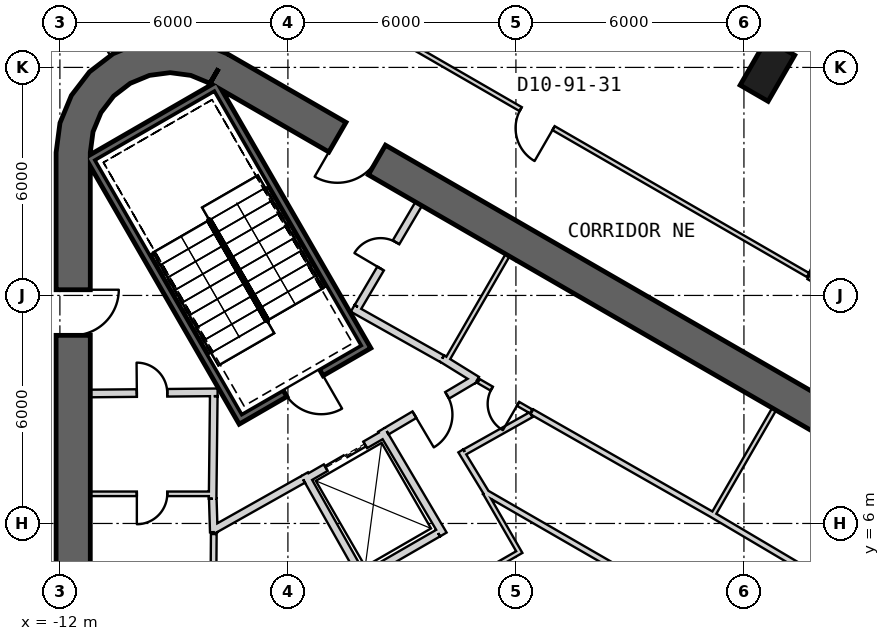
"""IFC4 building model, lengths in metres.
Left out: names, types, materials, properties, quantities, classifications, styles, units other than length and angle.
Written with IfcOpenShell. Run it as: python <this file> out.ifc"""

import sys

from ifc_helpers import new_model, si_unit, direction, frame, frame_2d, origin, origin_2d, place, context, subcontext, project, spatial, polyline, rectangle, outline, extrude, element, fill, save


model = new_model("IFC4")
c1 = context("Model", 3, precision=1e-05, world=origin(), true_north=direction((0.0, 1.0)))
c2 = subcontext(c1, "Body", "Model", "MODEL_VIEW")
j1 = project(units=[si_unit("LENGTHUNIT", "METRE"), si_unit("PLANEANGLEUNIT", "RADIAN")], contexts=[c1])
p1 = place(None, origin())
s1 = spatial("IfcSite", under=j1, at=p1, CompositionType="ELEMENT")
p2 = place(p1, origin())
s2 = spatial("IfcBuilding", under=s1, at=p2, CompositionType="ELEMENT")
p3 = place(p2, frame((0.0, 0.0, 398.3)))
s3 = spatial("IfcBuildingStorey", under=s2, at=p3, CompositionType="ELEMENT", Elevation=398.3)
p4 = place(p3, frame((6.618, 17.927, -0.3), z_axis=(0.0, 0.0, 1.0), x_axis=(0.5, 0.866025403784, 0.0)))
e1 = element("IfcColumn", 1, at=p4, inside=s3, PredefinedType="COLUMN", context=c2, shape_type="SweptSolid", body=[
    extrude(rectangle(XDim=1.4, YDim=0.85, at=origin_2d()), origin(), (0.0, 0.0, 1.0), 6.8),
])
p5 = place(p3, frame((19.475, 2.208, 0.0), z_axis=(0.0, 0.0, 1.0), x_axis=(-0.866028369851, 0.499994862586, 0.0)))
e2 = element("IfcWall", 2, at=p5, inside=s3, PredefinedType="SHEAR", context=c2, shape_type="SweptSolid", body=[
    extrude(rectangle(XDim=31.523, YDim=0.9, at=frame_2d((15.762, 0.0))), origin(), (0.0, 0.0, 1.0), 6.5),
])
p6 = place(p5, frame((3.612, 0.0, 0.0)))
e3 = element("IfcOpeningElement", 3, at=p6, cuts=e2, PredefinedType="OPENING", context=c2, shape_type="SweptSolid", body=[
    extrude(rectangle(XDim=1.2, YDim=2.4, at=frame_2d((0.6, 1.2))), frame((0.0, 0.46, 0.0), z_axis=(0.0, -1.0, 0.0), x_axis=(1.0, 0.0, 0.0)), (0.0, 0.0, 1.0), 0.92),
])
p7 = place(p5, frame((26.712, 0.0, 0.0)))
e4 = element("IfcOpeningElement", 4, at=p7, cuts=e2, PredefinedType="OPENING", context=c2, shape_type="SweptSolid", body=[
    extrude(rectangle(XDim=1.2, YDim=2.4, at=frame_2d((0.6, 1.2))), frame((0.0, 0.46, 0.0), z_axis=(0.0, -1.0, 0.0), x_axis=(1.0, 0.0, 0.0)), (0.0, 0.0, 1.0), 0.92),
])
p8 = place(p3, frame((-11.65, 15.762, 0.0), z_axis=(0.0, 0.0, 1.0), x_axis=(0.0, -1.0, 0.0)))
e5 = element("IfcWall", 5, at=p8, inside=s3, PredefinedType="SHEAR", context=c2, shape_type="SweptSolid", body=[
    extrude(rectangle(XDim=31.523, YDim=0.9, at=frame_2d((15.762, 0.0))), origin(), (0.0, 0.0, 1.0), 6.5),
])
p9 = place(p8, frame((3.612, 0.0, 0.0)))
e6 = element("IfcOpeningElement", 6, at=p9, cuts=e5, PredefinedType="OPENING", context=c2, shape_type="SweptSolid", body=[
    extrude(rectangle(XDim=1.2, YDim=2.4, at=frame_2d((0.6, 1.2))), frame((0.0, 0.46, 0.0), z_axis=(0.0, -1.0, 0.0), x_axis=(1.0, 0.0, 0.0)), (0.0, 0.0, 1.0), 0.92),
])
p10 = place(p8, frame((26.712, 0.0, 0.0)))
e7 = element("IfcOpeningElement", 7, at=p10, cuts=e5, PredefinedType="OPENING", context=c2, shape_type="SweptSolid", body=[
    extrude(rectangle(XDim=1.2, YDim=2.4, at=frame_2d((0.6, 1.2))), frame((0.0, 0.46, 0.0), z_axis=(0.0, -1.0, 0.0), x_axis=(1.0, 0.0, 0.0)), (0.0, 0.0, 1.0), 0.92),
])
p11 = place(p3, origin())
e8 = element("IfcWall", 8, at=p11, inside=s3, PredefinedType="SHEAR", context=c2, shape_type="SweptSolid", body=[
    extrude(outline(polyline([(-7.6, 18.36), (-8.323, 18.659), (-9.1, 18.762), (-9.876, 18.659), (-10.6, 18.36), (-11.221, 17.883), (-11.698, 17.262), (-11.998, 16.538), (-12.1, 15.762), (-11.2, 15.762), (-11.128, 16.305), (-10.919, 16.812), (-10.585, 17.247), (-10.15, 17.58), (-9.644, 17.79), (-9.1, 17.862), (-8.556, 17.79), (-8.05, 17.58), (-7.6, 18.36)])), origin(), (0.0, 0.0, 1.0), 6.5),
])
p12 = place(p3, frame((-11.245, 15.678, -0.3), z_axis=(0.0, 0.0, 1.0), x_axis=(0.499977274689, -0.866038523851, 0.0)))
e9 = element("IfcWall", 9, at=p12, inside=s3, PredefinedType="SHEAR", context=c2, shape_type="SweptSolid", body=[
    extrude(rectangle(XDim=8.1, YDim=0.2, at=frame_2d((4.05, 0.0))), origin(), (0.0, 0.0, 1.0), 6.5),
])
p13 = place(p3, frame((-7.818, 17.541, -0.3), z_axis=(0.0, 0.0, 1.0), x_axis=(-0.866044365799, -0.499967155389, 0.0)))
e10 = element("IfcWall", 10, at=p13, inside=s3, PredefinedType="SHEAR", context=c2, shape_type="SweptSolid", body=[
    extrude(rectangle(XDim=3.8, YDim=0.2, at=frame_2d((1.9, 0.0))), origin(), (0.0, 0.0, 1.0), 6.5),
])
p14 = place(p3, frame((-7.854, 17.405, -0.3), z_axis=(0.0, 0.0, 1.0), x_axis=(0.499997992926, -0.866026562566, 0.0)))
e11 = element("IfcWall", 11, at=p14, inside=s3, PredefinedType="SHEAR", context=c2, shape_type="SweptSolid", body=[
    extrude(rectangle(XDim=7.9, YDim=0.2, at=frame_2d((3.95, 0.0))), origin(), (0.0, 0.0, 1.0), 6.5),
])
p15 = place(p3, frame((-7.159, 8.8, -0.3), z_axis=(0.0, 0.0, 1.0), x_axis=(0.866047807691, 0.499961193289, 0.0)))
e12 = element("IfcWall", 12, at=p15, inside=s3, PredefinedType="SHEAR", context=c2, shape_type="SweptSolid", body=[
    extrude(rectangle(XDim=3.6, YDim=0.2, at=frame_2d((1.8, 0.0))), origin(), (0.0, 0.0, 1.0), 6.5),
])
p16 = place(p15, frame((1.25, 0.0, 0.3)))
e13 = element("IfcOpeningElement", 13, at=p16, cuts=e12, PredefinedType="OPENING", context=c2, shape_type="SweptSolid", body=[
    extrude(rectangle(XDim=1.1, YDim=2.1, at=frame_2d((0.55, 1.05))), frame((0.0, 0.11, 0.0), z_axis=(0.0, -1.0, 0.0), x_axis=(1.0, 0.0, 0.0)), (0.0, 0.0, 1.0), 0.22),
])
p17 = place(p3, frame((-5.524, 7.168, 0.0), z_axis=(0.0, 0.0, 1.0), x_axis=(0.866024647952, 0.500001309137, 0.0)))
e14 = element("IfcWall", 14, at=p17, inside=s3, PredefinedType="PLUMBINGWALL", context=c2, shape_type="SweptSolid", body=[
    extrude(rectangle(XDim=2.4, YDim=0.2, at=frame_2d((1.2, 0.0))), origin(), (0.0, 0.0, 1.0), 6.2),
])
p18 = place(p17, frame((0.6, 0.0, 0.0)))
e15 = element("IfcOpeningElement", 15, at=p18, cuts=e14, PredefinedType="OPENING", context=c2, shape_type="SweptSolid", body=[
    extrude(rectangle(XDim=1.2, YDim=2.4, at=frame_2d((0.6, 1.2))), frame((0.0, 0.11, 0.0), z_axis=(0.0, -1.0, 0.0), x_axis=(1.0, 0.0, 0.0)), (0.0, 0.0, 1.0), 0.22),
])
p19 = place(p3, frame((-2.047, 5.746, 0.0), z_axis=(0.0, 0.0, 1.0), x_axis=(-0.86605622881, -0.499946605688, 0.0)))
e16 = element("IfcWall", 16, at=p19, inside=s3, PredefinedType="PLUMBINGWALL", context=c2, shape_type="SweptSolid", body=[
    extrude(rectangle(XDim=2.2, YDim=0.2, at=frame_2d((1.1, 0.0))), origin(), (0.0, 0.0, 1.0), 6.2),
])
p20 = place(p3, frame((-3.99, 4.509, 0.0), z_axis=(0.0, 0.0, 1.0), x_axis=(-0.491358283181, 0.870957540612, 0.0)))
e17 = element("IfcWall", 17, at=p20, inside=s3, PredefinedType="PLUMBINGWALL", context=c2, shape_type="SweptSolid", body=[
    extrude(rectangle(XDim=3.2, YDim=0.2, at=frame_2d((1.6, 0.0))), origin(), (0.0, 0.0, 1.0), 6.2),
])
p21 = place(p3, frame((-3.538, 8.465, 0.0), z_axis=(0.0, 0.0, 1.0), x_axis=(0.508616218331, -0.860993346345, 0.0)))
e18 = element("IfcWall", 18, at=p21, inside=s3, PredefinedType="PLUMBINGWALL", context=c2, shape_type="SweptSolid", body=[
    extrude(rectangle(XDim=3.2, YDim=0.2, at=frame_2d((1.6, 0.0))), origin(), (0.0, 0.0, 1.0), 6.2),
])
p22 = place(p3, frame((-7.95, 6.78, 0.0), z_axis=(0.0, 0.0, 1.0), x_axis=(-1.0, 0.0, 0.0)))
e19 = element("IfcWall", 19, at=p22, inside=s3, PredefinedType="PARTITIONING", context=c2, shape_type="SweptSolid", body=[
    extrude(rectangle(XDim=3.25, YDim=0.12, at=frame_2d((1.625, 0.0))), origin(), (0.0, 0.0, 1.0), 6.2),
])
p23 = place(p22, frame((1.225, 0.0, 0.0)))
e20 = element("IfcOpeningElement", 20, at=p23, cuts=e19, PredefinedType="OPENING", context=c2, shape_type="SweptSolid", body=[
    extrude(rectangle(XDim=0.8, YDim=2.1, at=frame_2d((0.4, 1.05))), frame((0.0, 0.07, 0.0), z_axis=(0.0, -1.0, 0.0), x_axis=(1.0, 0.0, 0.0)), (0.0, 0.0, 1.0), 0.14),
])
p24 = place(p3, frame((-7.85, 9.451, 0.0), z_axis=(0.0, 0.0, 1.0), x_axis=(-0.999957167047, -0.009255488683, 0.0)))
e21 = element("IfcWall", 21, at=p24, inside=s3, PredefinedType="PARTITIONING", context=c2, shape_type="SweptSolid", body=[
    extrude(rectangle(XDim=3.35, YDim=0.2, at=frame_2d((1.675, 0.0))), origin(), (0.0, 0.0, 1.0), 6.2),
])
p25 = place(p24, frame((1.325, 0.0, 0.0)))
e22 = element("IfcOpeningElement", 22, at=p25, cuts=e21, PredefinedType="OPENING", context=c2, shape_type="SweptSolid", body=[
    extrude(rectangle(XDim=0.8, YDim=2.1, at=frame_2d((0.4, 1.05))), frame((0.0, 0.11, 0.0), z_axis=(0.0, -1.0, 0.0), x_axis=(1.0, 0.0, 0.0)), (0.0, 0.0, 1.0), 0.22),
])
p26 = place(p3, frame((-7.981, 6.65, 0.0), z_axis=(0.0, 0.0, 1.0), x_axis=(0.011120469654, 0.999938165666, 0.0)))
e23 = element("IfcWall", 23, at=p26, inside=s3, PredefinedType="PARTITIONING", context=c2, shape_type="SweptSolid", body=[
    extrude(rectangle(XDim=2.7, YDim=0.2, at=frame_2d((1.35, 0.0))), origin(), (0.0, 0.0, 1.0), 6.2),
])
p27 = place(p3, frame((-7.95, 5.772, 0.0), z_axis=(0.0, 0.0, 1.0), x_axis=(-0.030861509705, 0.999523670164, 0.0)))
e24 = element("IfcWall", 24, at=p27, inside=s3, PredefinedType="PARTITIONING", context=c2, shape_type="SweptSolid", body=[
    extrude(rectangle(XDim=0.878, YDim=0.2, at=frame_2d((0.439, 0.0))), origin(), (0.0, 0.0, 1.0), 6.2),
])
p28 = place(p3, frame((-7.951, 5.722, 0.0), z_axis=(0.0, 0.0, 1.0), x_axis=(-0.006701139535, -0.999977547112, 0.0)))
e25 = element("IfcWall", 25, at=p28, inside=s3, PredefinedType="PLUMBINGWALL", context=c2, shape_type="SweptSolid", body=[
    extrude(rectangle(XDim=4.372, YDim=0.15, at=frame_2d((2.186, 0.0))), origin(), (0.0, 0.0, 1.0), 6.2),
])
p29 = place(p3, frame((5.17, 6.195, 0.0), z_axis=(0.0, 0.0, 1.0), x_axis=(0.499984717929, 0.866034226713, 0.0)))
e26 = element("IfcWall", 26, at=p29, inside=s3, PredefinedType="PARTITIONING", context=c2, shape_type="SweptSolid", body=[
    extrude(rectangle(XDim=3.25, YDim=0.12, at=frame_2d((1.625, 0.0))), origin(), (0.0, 0.0, 1.0), 6.2),
])
p30 = place(p3, frame((7.53, 4.833, 0.0), z_axis=(0.0, 0.0, 1.0), x_axis=(-0.860550523279, 0.509365091938, 0.0)))
e27 = element("IfcWall", 27, at=p30, inside=s3, PredefinedType="PLUMBINGWALL", context=c2, shape_type="SweptSolid", body=[
    extrude(rectangle(XDim=2.755, YDim=0.15, at=frame_2d((1.377, 0.0))), origin(), (0.0, 0.0, 1.0), 6.2),
])
p31 = place(p3, frame((-0.22, 13.06, 0.0), z_axis=(0.0, 0.0, 1.0), x_axis=(-0.499984717929, -0.866034226713, 0.0)))
e28 = element("IfcWall", 28, at=p31, inside=s3, PredefinedType="PARTITIONING", context=c2, shape_type="SweptSolid", body=[
    extrude(rectangle(XDim=3.25, YDim=0.12, at=frame_2d((1.625, 0.0))), origin(), (0.0, 0.0, 1.0), 6.2),
])
p32 = place(p3, frame((-1.941, 10.339, 0.0), z_axis=(0.0, 0.0, 1.0), x_axis=(0.850216889117, -0.526432561171, 0.0)))
e29 = element("IfcWall", 29, at=p32, inside=s3, PredefinedType="PARTITIONING", context=c2, shape_type="SweptSolid", body=[
    extrude(rectangle(XDim=1.078, YDim=0.2, at=frame_2d((0.539, 0.0))), origin(), (0.0, 0.0, 1.0), 6.2),
])
p33 = place(p3, frame((0.42, 8.938, 0.0), z_axis=(0.0, 0.0, 1.0), x_axis=(0.868754934783, -0.495242226886, 0.0)))
e30 = element("IfcWall", 30, at=p33, inside=s3, PredefinedType="PLUMBINGWALL", context=c2, shape_type="SweptSolid", body=[
    extrude(rectangle(XDim=5.455, YDim=0.15, at=frame_2d((2.728, 0.0))), origin(), (0.0, 0.0, 1.0), 6.2),
])
p34 = place(p3, frame((-0.981, 9.746, 0.0), z_axis=(0.0, 0.0, 1.0), x_axis=(0.866019818373, -0.500009674092, 0.0)))
e31 = element("IfcWall", 31, at=p34, inside=s3, PredefinedType="PARTITIONING", context=c2, shape_type="SweptSolid", body=[
    extrude(rectangle(XDim=1.594, YDim=0.12, at=frame_2d((0.797, 0.0))), origin(), (0.0, 0.0, 1.0), 6.2),
])
p35 = place(p34, frame((0.397, 0.0, 0.0)))
e32 = element("IfcOpeningElement", 32, at=p35, cuts=e31, PredefinedType="OPENING", context=c2, shape_type="SweptSolid", body=[
    extrude(rectangle(XDim=0.8, YDim=2.1, at=frame_2d((0.4, 1.05))), frame((0.0, 0.07, 0.0), z_axis=(0.0, -1.0, 0.0), x_axis=(1.0, 0.0, 0.0)), (0.0, 0.0, 1.0), 0.14),
])
p36 = place(p3, frame((-4.296, 11.659, 0.0), z_axis=(0.0, 0.0, 1.0), x_axis=(0.871534483978, -0.490334215854, 0.0)))
e33 = element("IfcWall", 33, at=p36, inside=s3, PredefinedType="PARTITIONING", context=c2, shape_type="SweptSolid", body=[
    extrude(rectangle(XDim=2.7, YDim=0.2, at=frame_2d((1.35, 0.0))), origin(), (0.0, 0.0, 1.0), 6.2),
])
p37 = place(p3, frame((-2.558, 14.409, 0.0), z_axis=(0.0, 0.0, 1.0), x_axis=(-0.508018930956, -0.861345903683, 0.0)))
e34 = element("IfcWall", 34, at=p37, inside=s3, PredefinedType="PARTITIONING", context=c2, shape_type="SweptSolid", body=[
    extrude(rectangle(XDim=3.15, YDim=0.2, at=frame_2d((1.575, 0.0))), origin(), (0.0, 0.0, 1.0), 6.2),
])
p38 = place(p37, frame((1.175, 0.0, 0.0)))
e35 = element("IfcOpeningElement", 35, at=p38, cuts=e34, PredefinedType="OPENING", context=c2, shape_type="SweptSolid", body=[
    extrude(rectangle(XDim=0.8, YDim=2.1, at=frame_2d((0.4, 1.05))), frame((0.0, 0.11, 0.0), z_axis=(0.0, -1.0, 0.0), x_axis=(1.0, 0.0, 0.0)), (0.0, 0.0, 1.0), 0.22),
])
p39 = place(p3, frame((-5.6, 7.16, 0.0), z_axis=(0.0, 0.0, 1.0), x_axis=(-0.871345799774, -0.490669437825, 0.0)))
e36 = element("IfcWall", 36, at=p39, inside=s3, PredefinedType="PARTITIONING", context=c2, shape_type="SweptSolid", body=[
    extrude(rectangle(XDim=2.726, YDim=0.2, at=frame_2d((1.363, 0.0))), origin(), (0.0, 0.0, 1.0), 6.2),
])
p40 = place(p3, frame((-1.069, 9.81, 0.0), z_axis=(0.0, 0.0, 1.0), x_axis=(-0.860617791406, -0.509251428192, 0.0)))
e37 = element("IfcWall", 37, at=p40, inside=s3, PredefinedType="PARTITIONING", context=c2, shape_type="SweptSolid", body=[
    extrude(rectangle(XDim=2.709, YDim=0.2, at=frame_2d((1.354, 0.0))), origin(), (0.0, 0.0, 1.0), 6.2),
])
p41 = place(p40, frame((0.861, 0.0, 0.0)))
e38 = element("IfcOpeningElement", 38, at=p41, cuts=e37, PredefinedType="OPENING", context=c2, shape_type="SweptSolid", body=[
    extrude(rectangle(XDim=1.0, YDim=2.1, at=frame_2d((0.5, 1.05))), frame((0.0, 0.11, 0.0), z_axis=(0.0, -1.0, 0.0), x_axis=(1.0, 0.0, 0.0)), (0.0, 0.0, 1.0), 0.22),
])
p42 = place(p3, frame((-0.827, 6.832, 0.0), z_axis=(0.0, 0.0, 1.0), x_axis=(0.866020293397, -0.500008851346, 0.0)))
e39 = element("IfcWall", 39, at=p42, inside=s3, PredefinedType="PLUMBINGWALL", context=c2, shape_type="SweptSolid", body=[
    extrude(rectangle(XDim=8.264, YDim=0.15, at=frame_2d((4.132, 0.0))), origin(), (0.0, 0.0, 1.0), 6.2),
])
p43 = place(p3, frame((-1.451, 7.909, 0.0), z_axis=(0.0, 0.0, 1.0), x_axis=(0.520332410011, -0.853963806664, 0.0)))
e40 = element("IfcWall", 40, at=p43, inside=s3, PredefinedType="PLUMBINGWALL", context=c2, shape_type="SweptSolid", body=[
    extrude(rectangle(XDim=1.326, YDim=0.15, at=frame_2d((0.663, 0.0))), origin(), (0.0, 0.0, 1.0), 6.2),
])
p44 = place(p3, frame((0.399, 8.863, 0.0), z_axis=(0.0, 0.0, 1.0), x_axis=(-0.871829419551, -0.489809619348, 0.0)))
e41 = element("IfcWall", 41, at=p44, inside=s3, PredefinedType="PLUMBINGWALL", context=c2, shape_type="SweptSolid", body=[
    extrude(rectangle(XDim=2.002, YDim=0.15, at=frame_2d((1.001, 0.0))), origin(), (0.0, 0.0, 1.0), 6.2),
])
p45 = place(p3, frame((0.14, 5.277, 0.0), z_axis=(0.0, 0.0, 1.0), x_axis=(-0.866000971088, -0.500042316284, 0.0)))
e42 = element("IfcWall", 42, at=p45, inside=s3, PredefinedType="PARTITIONING", context=c2, shape_type="SweptSolid", body=[
    extrude(rectangle(XDim=1.85, YDim=0.12, at=frame_2d((0.925, 0.0))), origin(), (0.0, 0.0, 1.0), 6.2),
])
p46 = place(p3, frame((-0.812, 6.806, 0.0), z_axis=(0.0, 0.0, 1.0), x_axis=(0.500046227757, -0.865998712531, 0.0)))
e43 = element("IfcWall", 43, at=p46, inside=s3, PredefinedType="PARTITIONING", context=c2, shape_type="SweptSolid", body=[
    extrude(rectangle(XDim=1.74, YDim=0.12, at=frame_2d((0.87, 0.0))), origin(), (0.0, 0.0, 1.0), 6.2),
])
p47 = place(p3, frame((-11.849, 20.463, 0.0), z_axis=(0.0, 0.0, 1.0), x_axis=(0.500047596559, -0.865997922154, 0.0)))
e44 = element("IfcWall", 44, at=p47, inside=s3, PredefinedType="PARTITIONING", context=c2, shape_type="SweptSolid", body=[
    extrude(rectangle(XDim=2.6, YDim=0.12, at=frame_2d((1.3, 0.0))), origin(), (0.0, 0.0, 1.0), 5.57),
])
p48 = place(p3, frame((21.552, 4.531, 0.0), z_axis=(0.0, 0.0, 1.0), x_axis=(-0.86602469383, 0.500001229675, 0.0)))
e45 = element("IfcWall", 45, at=p48, inside=s3, PredefinedType="PARTITIONING", context=c2, shape_type="SweptSolid", body=[
    extrude(rectangle(XDim=15.97, YDim=0.2, at=frame_2d((7.985, 0.0))), origin(), (0.0, 0.0, 1.0), 5.57),
])
p49 = place(p48, frame((7.5, 0.0, 0.0)))
e46 = element("IfcOpeningElement", 46, at=p49, cuts=e45, PredefinedType="OPENING", context=c2, shape_type="SweptSolid", body=[
    extrude(rectangle(XDim=1.0, YDim=2.1, at=frame_2d((0.5, 1.05))), frame((0.0, 0.11, 0.0), z_axis=(0.0, -1.0, 0.0), x_axis=(1.0, 0.0, 0.0)), (0.0, 0.0, 1.0), 0.22),
])
p50 = place(p3, frame((7.687, 12.536, 0.0), z_axis=(0.0, 0.0, 1.0), x_axis=(-0.866029110027, 0.499993580544, 0.0)))
e47 = element("IfcWall", 47, at=p50, inside=s3, PredefinedType="PARTITIONING", context=c2, shape_type="SweptSolid", body=[
    extrude(rectangle(XDim=16.629, YDim=0.12, at=frame_2d((8.314, 0.0))), origin(), (0.0, 0.0, 1.0), 5.57),
])
p51 = place(p50, frame((7.732, 0.0, 0.0)))
e48 = element("IfcOpeningElement", 48, at=p51, cuts=e47, PredefinedType="OPENING", context=c2, shape_type="SweptSolid", body=[
    extrude(rectangle(XDim=1.0, YDim=2.1, at=frame_2d((0.5, 1.05))), frame((0.0, 0.07, 0.0), z_axis=(0.0, -1.0, 0.0), x_axis=(1.0, 0.0, 0.0)), (0.0, 0.0, 1.0), 0.14),
])
p52 = place(p3, frame((7.817, 12.576, 0.0), z_axis=(0.0, 0.0, 1.0), x_axis=(0.43107042423, 0.902318286058, 0.0)))
e49 = element("IfcWall", 49, at=p52, inside=s3, PredefinedType="PARTITIONING", context=c2, shape_type="SweptSolid", body=[
    extrude(rectangle(XDim=5.833, YDim=0.2, at=frame_2d((2.917, 0.0))), origin(), (0.0, 0.0, 1.0), 6.2),
])
p53 = place(p16, origin())
e50 = element("IfcDoor", 50, at=p53, inside=s3, OperationType="SINGLE_SWING_RIGHT", PredefinedType="USERDEFINED", context=c2, shape_type="SweptSolid", body=[
    extrude(rectangle(XDim=1.1, YDim=2.1, at=frame_2d((0.55, 1.05))), frame((0.0, 0.025, 0.0), z_axis=(0.0, -1.0, 0.0), x_axis=(1.0, 0.0, 0.0)), (0.0, 0.0, 1.0), 0.05),
])
fill(e13, e50)
p54 = place(p41, origin())
e51 = element("IfcDoor", 51, at=p54, inside=s3, OperationType="SINGLE_SWING_RIGHT", PredefinedType="USERDEFINED", context=c2, shape_type="SweptSolid", body=[
    extrude(rectangle(XDim=1.0, YDim=2.1, at=frame_2d((0.5, 1.05))), frame((0.0, 0.025, 0.0), z_axis=(0.0, -1.0, 0.0), x_axis=(1.0, 0.0, 0.0)), (0.0, 0.0, 1.0), 0.05),
])
fill(e38, e51)
p55 = place(p18, origin())
e52 = element("IfcDoor", 52, at=p55, inside=s3, OperationType="SLIDING_TO_LEFT", PredefinedType="USERDEFINED", context=c2, shape_type="SweptSolid", body=[
    extrude(rectangle(XDim=1.2, YDim=2.4, at=frame_2d((0.6, 1.2))), frame((0.0, 0.025, 0.0), z_axis=(0.0, -1.0, 0.0), x_axis=(1.0, 0.0, 0.0)), (0.0, 0.0, 1.0), 0.05),
])
fill(e15, e52)
p56 = place(p25, origin())
e53 = element("IfcDoor", 53, at=p56, inside=s3, OperationType="SINGLE_SWING_RIGHT", PredefinedType="USERDEFINED", context=c2, shape_type="SweptSolid", body=[
    extrude(rectangle(XDim=0.8, YDim=2.1, at=frame_2d((0.4, 1.05))), frame((0.0, 0.025, 0.0), z_axis=(0.0, -1.0, 0.0), x_axis=(1.0, 0.0, 0.0)), (0.0, 0.0, 1.0), 0.05),
])
fill(e22, e53)
p57 = place(p23, origin())
e54 = element("IfcDoor", 54, at=p57, inside=s3, OperationType="SINGLE_SWING_RIGHT", PredefinedType="USERDEFINED", context=c2, shape_type="SweptSolid", body=[
    extrude(rectangle(XDim=0.8, YDim=2.1, at=frame_2d((0.4, 1.05))), frame((0.0, 0.025, 0.0), z_axis=(0.0, -1.0, 0.0), x_axis=(1.0, 0.0, 0.0)), (0.0, 0.0, 1.0), 0.05),
])
fill(e20, e54)
p58 = place(p35, origin())
e55 = element("IfcDoor", 55, at=p58, inside=s3, OperationType="SINGLE_SWING_RIGHT", PredefinedType="USERDEFINED", context=c2, shape_type="SweptSolid", body=[
    extrude(rectangle(XDim=0.8, YDim=2.1, at=frame_2d((0.4, 1.05))), frame((0.0, 0.025, 0.0), z_axis=(0.0, -1.0, 0.0), x_axis=(1.0, 0.0, 0.0)), (0.0, 0.0, 1.0), 0.05),
])
fill(e32, e55)
p59 = place(p38, origin())
e56 = element("IfcDoor", 56, at=p59, inside=s3, OperationType="SINGLE_SWING_RIGHT", PredefinedType="USERDEFINED", context=c2, shape_type="SweptSolid", body=[
    extrude(rectangle(XDim=0.8, YDim=2.1, at=frame_2d((0.4, 1.05))), frame((0.0, 0.025, 0.0), z_axis=(0.0, -1.0, 0.0), x_axis=(1.0, 0.0, 0.0)), (0.0, 0.0, 1.0), 0.05),
])
fill(e35, e56)
p60 = place(p51, origin())
e57 = element("IfcDoor", 57, at=p60, inside=s3, OperationType="SINGLE_SWING_LEFT", PredefinedType="NOTDEFINED", context=c2, shape_type="SweptSolid", body=[
    extrude(rectangle(XDim=1.0, YDim=2.1, at=frame_2d((0.5, 1.05))), frame((0.0, 0.025, 0.0), z_axis=(0.0, -1.0, 0.0), x_axis=(1.0, 0.0, 0.0)), (0.0, 0.0, 1.0), 0.05),
])
fill(e48, e57)
p61 = place(p7, origin())
e58 = element("IfcDoor", 58, at=p61, inside=s3, OperationType="SINGLE_SWING_RIGHT", PredefinedType="USERDEFINED", context=c2, shape_type="SweptSolid", body=[
    extrude(rectangle(XDim=1.2, YDim=2.4, at=frame_2d((0.6, 1.2))), frame((0.0, 0.025, 0.0), z_axis=(0.0, -1.0, 0.0), x_axis=(1.0, 0.0, 0.0)), (0.0, 0.0, 1.0), 0.05),
])
fill(e4, e58)
p62 = place(p9, origin())
e59 = element("IfcDoor", 59, at=p62, inside=s3, OperationType="SINGLE_SWING_LEFT", PredefinedType="USERDEFINED", context=c2, shape_type="SweptSolid", body=[
    extrude(rectangle(XDim=1.2, YDim=2.4, at=frame_2d((0.6, 1.2))), frame((0.0, 0.025, 0.0), z_axis=(0.0, -1.0, 0.0), x_axis=(1.0, 0.0, 0.0)), (0.0, 0.0, 1.0), 0.05),
])
fill(e6, e59)
save(model, sys.argv[1])
